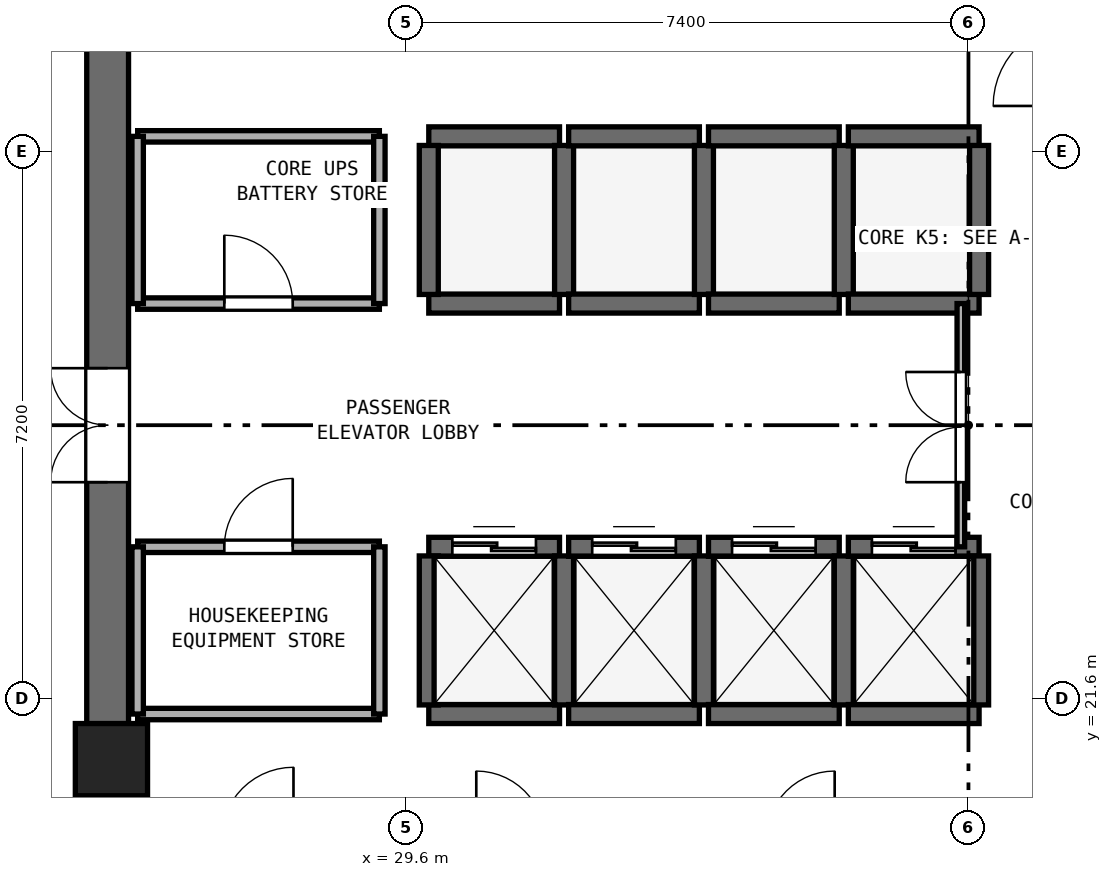
"""IFC4 building model, lengths in metres.
Left out: names, types, materials, properties, quantities, classifications, styles, units other than length and angle.
Written with IfcOpenShell. Run it as: python <this file> out.ifc"""

import sys

from ifc_helpers import new_model, si_unit, direction, frame, frame_2d, origin, origin_2d, place, context, subcontext, project, spatial, rectangle, extrude, element, fill, save


model = new_model("IFC4")
c1 = context("Model", 3, precision=1e-05, world=origin(), true_north=direction((0.0, 1.0)))
c2 = subcontext(c1, "Body", "Model", "MODEL_VIEW")
j1 = project(units=[si_unit("LENGTHUNIT", "METRE"), si_unit("PLANEANGLEUNIT", "RADIAN")], contexts=[c1])
p1 = place(None, origin())
s1 = spatial("IfcSite", under=j1, at=p1, CompositionType="ELEMENT")
p2 = place(p1, origin())
s2 = spatial("IfcBuilding", under=s1, at=p2, CompositionType="ELEMENT")
p3 = place(p2, frame((0.0, 0.0, 204.8)))
s3 = spatial("IfcBuildingStorey", under=s2, at=p3, CompositionType="ELEMENT", Elevation=204.8)
p4 = place(p3, frame((25.675, 17.55, 0.0), z_axis=(0.0, 0.0, 1.0), x_axis=(0.0, 1.0, 0.0)))
e1 = element("IfcWall", 1, at=p4, inside=s3, PredefinedType="SHEAR", context=c2, shape_type="SweptSolid", body=[
    extrude(rectangle(XDim=15.3, YDim=0.55, at=frame_2d((7.65, 0.0))), origin(), (0.0, 0.0, 1.0), 3.54),
])
p5 = place(p4, frame((6.9, 0.0, 0.0)))
e2 = element("IfcOpeningElement", 2, at=p5, cuts=e1, PredefinedType="OPENING", context=c2, shape_type="SweptSolid", body=[
    extrude(rectangle(XDim=1.5, YDim=2.15, at=frame_2d((0.75, 1.075))), frame((0.0, 0.285, 0.0), z_axis=(0.0, -1.0, 0.0), x_axis=(1.0, 0.0, 0.0)), (0.0, 0.0, 1.0), 0.57),
])
p6 = place(p3, frame((25.725, 20.8, 0.0), z_axis=(0.0, 0.0, 1.0), x_axis=(1.0, 0.0, 0.0)))
e3 = element("IfcColumn", 3, at=p6, inside=s3, PredefinedType="PILASTER", context=c2, shape_type="SweptSolid", body=[
    extrude(rectangle(XDim=0.95, YDim=0.95, at=origin_2d()), origin(), (0.0, 0.0, 1.0), 3.8),
])
p7 = place(p3, frame((29.9, 21.4, 0.0), z_axis=(0.0, 0.0, 1.0), x_axis=(1.0, 0.0, 0.0)))
e4 = element("IfcWall", 4, at=p7, inside=s3, PredefinedType="SHEAR", context=c2, shape_type="SweptSolid", body=[
    extrude(rectangle(XDim=1.72, YDim=0.25, at=frame_2d((0.86, 0.0))), origin(), (0.0, 0.0, 1.0), 3.54),
])
p8 = place(p3, frame((29.9, 23.6, 0.0), z_axis=(0.0, 0.0, 1.0), x_axis=(1.0, 0.0, 0.0)))
e5 = element("IfcWall", 5, at=p8, inside=s3, PredefinedType="SHEAR", context=c2, shape_type="SweptSolid", body=[
    extrude(rectangle(XDim=1.72, YDim=0.25, at=frame_2d((0.86, 0.0))), origin(), (0.0, 0.0, 1.0), 3.54),
])
p9 = place(p8, frame((0.31, 0.0, 0.0)))
e6 = element("IfcOpeningElement", 6, at=p9, cuts=e5, PredefinedType="OPENING", context=c2, shape_type="SweptSolid", body=[
    extrude(rectangle(XDim=1.1, YDim=2.15, at=frame_2d((0.55, 1.075))), frame((0.0, 0.135, 0.0), z_axis=(0.0, -1.0, 0.0), x_axis=(1.0, 0.0, 0.0)), (0.0, 0.0, 1.0), 0.27),
])
for number, where, z_axis, x_axis in (
    (7, (29.9, 21.52, 0.0), (0.0, 0.0, 1.0), (0.0, 1.0, 0.0)),
    (8, (31.68, 21.52, 0.0), (0.0, 0.0, 1.0), (0.0, 1.0, 0.0)),
):
    element("IfcWall", number, at=place(p3, frame(where, z_axis=z_axis, x_axis=x_axis)), inside=s3, PredefinedType="SHEAR", context=c2, shape_type="SweptSolid", body=[
        extrude(rectangle(XDim=1.96, YDim=0.25, at=frame_2d((0.98, 0.0))), origin(), (0.0, 0.0, 1.0), 3.54),
    ])
p10 = place(p3, frame((31.74, 21.4, 0.0), z_axis=(0.0, 0.0, 1.0), x_axis=(1.0, 0.0, 0.0)))
e9 = element("IfcWall", 9, at=p10, inside=s3, PredefinedType="SHEAR", context=c2, shape_type="SweptSolid", body=[
    extrude(rectangle(XDim=1.72, YDim=0.25, at=frame_2d((0.86, 0.0))), origin(), (0.0, 0.0, 1.0), 3.54),
])
p11 = place(p3, frame((31.74, 23.6, 0.0), z_axis=(0.0, 0.0, 1.0), x_axis=(1.0, 0.0, 0.0)))
e10 = element("IfcWall", 10, at=p11, inside=s3, PredefinedType="SHEAR", context=c2, shape_type="SweptSolid", body=[
    extrude(rectangle(XDim=1.72, YDim=0.25, at=frame_2d((0.86, 0.0))), origin(), (0.0, 0.0, 1.0), 3.54),
])
p12 = place(p11, frame((0.31, 0.0, 0.0)))
e11 = element("IfcOpeningElement", 11, at=p12, cuts=e10, PredefinedType="OPENING", context=c2, shape_type="SweptSolid", body=[
    extrude(rectangle(XDim=1.1, YDim=2.15, at=frame_2d((0.55, 1.075))), frame((0.0, 0.135, 0.0), z_axis=(0.0, -1.0, 0.0), x_axis=(1.0, 0.0, 0.0)), (0.0, 0.0, 1.0), 0.27),
])
p13 = place(p3, frame((33.52, 21.52, 0.0), z_axis=(0.0, 0.0, 1.0), x_axis=(0.0, 1.0, 0.0)))
e12 = element("IfcWall", 12, at=p13, inside=s3, PredefinedType="SHEAR", context=c2, shape_type="SweptSolid", body=[
    extrude(rectangle(XDim=1.96, YDim=0.25, at=frame_2d((0.98, 0.0))), origin(), (0.0, 0.0, 1.0), 3.54),
])
p14 = place(p3, frame((33.58, 21.4, 0.0), z_axis=(0.0, 0.0, 1.0), x_axis=(1.0, 0.0, 0.0)))
e13 = element("IfcWall", 13, at=p14, inside=s3, PredefinedType="SHEAR", context=c2, shape_type="SweptSolid", body=[
    extrude(rectangle(XDim=1.72, YDim=0.25, at=frame_2d((0.86, 0.0))), origin(), (0.0, 0.0, 1.0), 3.54),
])
p15 = place(p3, frame((33.58, 23.6, 0.0), z_axis=(0.0, 0.0, 1.0), x_axis=(1.0, 0.0, 0.0)))
e14 = element("IfcWall", 14, at=p15, inside=s3, PredefinedType="SHEAR", context=c2, shape_type="SweptSolid", body=[
    extrude(rectangle(XDim=1.72, YDim=0.25, at=frame_2d((0.86, 0.0))), origin(), (0.0, 0.0, 1.0), 3.54),
])
p16 = place(p15, frame((0.31, 0.0, 0.0)))
e15 = element("IfcOpeningElement", 15, at=p16, cuts=e14, PredefinedType="OPENING", context=c2, shape_type="SweptSolid", body=[
    extrude(rectangle(XDim=1.1, YDim=2.15, at=frame_2d((0.55, 1.075))), frame((0.0, 0.135, 0.0), z_axis=(0.0, -1.0, 0.0), x_axis=(1.0, 0.0, 0.0)), (0.0, 0.0, 1.0), 0.27),
])
p17 = place(p3, frame((35.36, 21.52, 0.0), z_axis=(0.0, 0.0, 1.0), x_axis=(0.0, 1.0, 0.0)))
e16 = element("IfcWall", 16, at=p17, inside=s3, PredefinedType="SHEAR", context=c2, shape_type="SweptSolid", body=[
    extrude(rectangle(XDim=1.96, YDim=0.25, at=frame_2d((0.98, 0.0))), origin(), (0.0, 0.0, 1.0), 3.54),
])
p18 = place(p3, frame((35.42, 21.4, 0.0), z_axis=(0.0, 0.0, 1.0), x_axis=(1.0, 0.0, 0.0)))
e17 = element("IfcWall", 17, at=p18, inside=s3, PredefinedType="SHEAR", context=c2, shape_type="SweptSolid", body=[
    extrude(rectangle(XDim=1.72, YDim=0.25, at=frame_2d((0.86, 0.0))), origin(), (0.0, 0.0, 1.0), 3.54),
])
p19 = place(p3, frame((35.42, 23.6, 0.0), z_axis=(0.0, 0.0, 1.0), x_axis=(1.0, 0.0, 0.0)))
e18 = element("IfcWall", 18, at=p19, inside=s3, PredefinedType="SHEAR", context=c2, shape_type="SweptSolid", body=[
    extrude(rectangle(XDim=1.72, YDim=0.25, at=frame_2d((0.86, 0.0))), origin(), (0.0, 0.0, 1.0), 3.54),
])
p20 = place(p19, frame((0.31, 0.0, 0.0)))
e19 = element("IfcOpeningElement", 19, at=p20, cuts=e18, PredefinedType="OPENING", context=c2, shape_type="SweptSolid", body=[
    extrude(rectangle(XDim=1.1, YDim=2.15, at=frame_2d((0.55, 1.075))), frame((0.0, 0.135, 0.0), z_axis=(0.0, -1.0, 0.0), x_axis=(1.0, 0.0, 0.0)), (0.0, 0.0, 1.0), 0.27),
])
p21 = place(p3, frame((37.14, 21.52, 0.0), z_axis=(0.0, 0.0, 1.0), x_axis=(0.0, 1.0, 0.0)))
e20 = element("IfcWall", 20, at=p21, inside=s3, PredefinedType="SHEAR", context=c2, shape_type="SweptSolid", body=[
    extrude(rectangle(XDim=1.96, YDim=0.25, at=frame_2d((0.98, 0.0))), origin(), (0.0, 0.0, 1.0), 3.54),
])
for number, where, z_axis, x_axis in (
    (21, (29.9, 26.8, 0.0), (0.0, 0.0, 1.0), (1.0, 0.0, 0.0)),
    (22, (29.9, 29.0, 0.0), (0.0, 0.0, 1.0), (1.0, 0.0, 0.0)),
):
    element("IfcWall", number, at=place(p3, frame(where, z_axis=z_axis, x_axis=x_axis)), inside=s3, PredefinedType="SHEAR", context=c2, shape_type="SweptSolid", body=[
        extrude(rectangle(XDim=1.72, YDim=0.25, at=frame_2d((0.86, 0.0))), origin(), (0.0, 0.0, 1.0), 3.54),
    ])
for number, where, z_axis, x_axis in (
    (23, (29.9, 26.92, 0.0), (0.0, 0.0, 1.0), (0.0, 1.0, 0.0)),
    (24, (31.68, 26.92, 0.0), (0.0, 0.0, 1.0), (0.0, 1.0, 0.0)),
):
    element("IfcWall", number, at=place(p3, frame(where, z_axis=z_axis, x_axis=x_axis)), inside=s3, PredefinedType="SHEAR", context=c2, shape_type="SweptSolid", body=[
        extrude(rectangle(XDim=1.96, YDim=0.25, at=frame_2d((0.98, 0.0))), origin(), (0.0, 0.0, 1.0), 3.54),
    ])
for number, where, z_axis, x_axis in (
    (25, (31.74, 26.8, 0.0), (0.0, 0.0, 1.0), (1.0, 0.0, 0.0)),
    (26, (31.74, 29.0, 0.0), (0.0, 0.0, 1.0), (1.0, 0.0, 0.0)),
):
    element("IfcWall", number, at=place(p3, frame(where, z_axis=z_axis, x_axis=x_axis)), inside=s3, PredefinedType="SHEAR", context=c2, shape_type="SweptSolid", body=[
        extrude(rectangle(XDim=1.72, YDim=0.25, at=frame_2d((0.86, 0.0))), origin(), (0.0, 0.0, 1.0), 3.54),
    ])
p22 = place(p3, frame((33.52, 26.92, 0.0), z_axis=(0.0, 0.0, 1.0), x_axis=(0.0, 1.0, 0.0)))
e27 = element("IfcWall", 27, at=p22, inside=s3, PredefinedType="SHEAR", context=c2, shape_type="SweptSolid", body=[
    extrude(rectangle(XDim=1.96, YDim=0.25, at=frame_2d((0.98, 0.0))), origin(), (0.0, 0.0, 1.0), 3.54),
])
for number, where, z_axis, x_axis in (
    (28, (33.58, 26.8, 0.0), (0.0, 0.0, 1.0), (1.0, 0.0, 0.0)),
    (29, (33.58, 29.0, 0.0), (0.0, 0.0, 1.0), (1.0, 0.0, 0.0)),
):
    element("IfcWall", number, at=place(p3, frame(where, z_axis=z_axis, x_axis=x_axis)), inside=s3, PredefinedType="SHEAR", context=c2, shape_type="SweptSolid", body=[
        extrude(rectangle(XDim=1.72, YDim=0.25, at=frame_2d((0.86, 0.0))), origin(), (0.0, 0.0, 1.0), 3.54),
    ])
p23 = place(p3, frame((35.36, 26.92, 0.0), z_axis=(0.0, 0.0, 1.0), x_axis=(0.0, 1.0, 0.0)))
e30 = element("IfcWall", 30, at=p23, inside=s3, PredefinedType="SHEAR", context=c2, shape_type="SweptSolid", body=[
    extrude(rectangle(XDim=1.96, YDim=0.25, at=frame_2d((0.98, 0.0))), origin(), (0.0, 0.0, 1.0), 3.54),
])
for number, where, z_axis, x_axis in (
    (31, (35.42, 26.8, 0.0), (0.0, 0.0, 1.0), (1.0, 0.0, 0.0)),
    (32, (35.42, 29.0, 0.0), (0.0, 0.0, 1.0), (1.0, 0.0, 0.0)),
):
    element("IfcWall", number, at=place(p3, frame(where, z_axis=z_axis, x_axis=x_axis)), inside=s3, PredefinedType="SHEAR", context=c2, shape_type="SweptSolid", body=[
        extrude(rectangle(XDim=1.72, YDim=0.25, at=frame_2d((0.86, 0.0))), origin(), (0.0, 0.0, 1.0), 3.54),
    ])
p24 = place(p3, frame((37.14, 26.92, 0.0), z_axis=(0.0, 0.0, 1.0), x_axis=(0.0, 1.0, 0.0)))
e33 = element("IfcWall", 33, at=p24, inside=s3, PredefinedType="SHEAR", context=c2, shape_type="SweptSolid", body=[
    extrude(rectangle(XDim=1.96, YDim=0.25, at=frame_2d((0.98, 0.0))), origin(), (0.0, 0.0, 1.0), 3.54),
])
p25 = place(p3, frame((26.07, 26.8, 0.0), z_axis=(0.0, 0.0, 1.0), x_axis=(1.0, 0.0, 0.0)))
e34 = element("IfcWall", 34, at=p25, inside=s3, PredefinedType="PARTITIONING", context=c2, shape_type="SweptSolid", body=[
    extrude(rectangle(XDim=3.18, YDim=0.15, at=frame_2d((1.59, 0.0))), origin(), (0.0, 0.0, 1.0), 3.54),
])
p26 = place(p25, frame((1.14, 0.0, 0.0)))
e35 = element("IfcOpeningElement", 35, at=p26, cuts=e34, PredefinedType="OPENING", context=c2, shape_type="SweptSolid", body=[
    extrude(rectangle(XDim=0.9, YDim=2.1, at=frame_2d((0.45, 1.05))), frame((0.0, 0.085, 0.0), z_axis=(0.0, -1.0, 0.0), x_axis=(1.0, 0.0, 0.0)), (0.0, 0.0, 1.0), 0.17),
])
p27 = place(p3, frame((26.07, 29.0, 0.0), z_axis=(0.0, 0.0, 1.0), x_axis=(1.0, 0.0, 0.0)))
e36 = element("IfcWall", 36, at=p27, inside=s3, PredefinedType="PARTITIONING", context=c2, shape_type="SweptSolid", body=[
    extrude(rectangle(XDim=3.18, YDim=0.15, at=frame_2d((1.59, 0.0))), origin(), (0.0, 0.0, 1.0), 3.54),
])
p28 = place(p3, frame((26.07, 26.8, 0.0), z_axis=(0.0, 0.0, 1.0), x_axis=(0.0, 1.0, 0.0)))
e37 = element("IfcWall", 37, at=p28, inside=s3, PredefinedType="PARTITIONING", context=c2, shape_type="SweptSolid", body=[
    extrude(rectangle(XDim=2.2, YDim=0.15, at=frame_2d((1.1, 0.0))), origin(), (0.0, 0.0, 1.0), 2.64),
])
p29 = place(p3, frame((29.25, 26.8, 0.0), z_axis=(0.0, 0.0, 1.0), x_axis=(0.0, 1.0, 0.0)))
e38 = element("IfcWall", 38, at=p29, inside=s3, PredefinedType="PARTITIONING", context=c2, shape_type="SweptSolid", body=[
    extrude(rectangle(XDim=2.2, YDim=0.15, at=frame_2d((1.1, 0.0))), origin(), (0.0, 0.0, 1.0), 3.54),
])
p30 = place(p3, frame((26.07, 21.4, 0.0), z_axis=(0.0, 0.0, 1.0), x_axis=(1.0, 0.0, 0.0)))
e39 = element("IfcWall", 39, at=p30, inside=s3, PredefinedType="PARTITIONING", context=c2, shape_type="SweptSolid", body=[
    extrude(rectangle(XDim=3.18, YDim=0.15, at=frame_2d((1.59, 0.0))), origin(), (0.0, 0.0, 1.0), 3.54),
])
p31 = place(p3, frame((26.07, 23.6, 0.0), z_axis=(0.0, 0.0, 1.0), x_axis=(1.0, 0.0, 0.0)))
e40 = element("IfcWall", 40, at=p31, inside=s3, PredefinedType="PARTITIONING", context=c2, shape_type="SweptSolid", body=[
    extrude(rectangle(XDim=3.18, YDim=0.15, at=frame_2d((1.59, 0.0))), origin(), (0.0, 0.0, 1.0), 3.54),
])
p32 = place(p31, frame((1.14, 0.0, 0.0)))
e41 = element("IfcOpeningElement", 41, at=p32, cuts=e40, PredefinedType="OPENING", context=c2, shape_type="SweptSolid", body=[
    extrude(rectangle(XDim=0.9, YDim=2.1, at=frame_2d((0.45, 1.05))), frame((0.0, 0.085, 0.0), z_axis=(0.0, -1.0, 0.0), x_axis=(1.0, 0.0, 0.0)), (0.0, 0.0, 1.0), 0.17),
])
p33 = place(p3, frame((26.07, 21.4, 0.0), z_axis=(0.0, 0.0, 1.0), x_axis=(0.0, 1.0, 0.0)))
e42 = element("IfcWall", 42, at=p33, inside=s3, PredefinedType="PARTITIONING", context=c2, shape_type="SweptSolid", body=[
    extrude(rectangle(XDim=2.2, YDim=0.15, at=frame_2d((1.1, 0.0))), origin(), (0.0, 0.0, 1.0), 2.64),
])
p34 = place(p3, frame((29.25, 21.4, 0.0), z_axis=(0.0, 0.0, 1.0), x_axis=(0.0, 1.0, 0.0)))
e43 = element("IfcWall", 43, at=p34, inside=s3, PredefinedType="PARTITIONING", context=c2, shape_type="SweptSolid", body=[
    extrude(rectangle(XDim=2.2, YDim=0.15, at=frame_2d((1.1, 0.0))), origin(), (0.0, 0.0, 1.0), 3.54),
])
p35 = place(p3, frame((36.9, 23.6, 0.0), z_axis=(0.0, 0.0, 1.0), x_axis=(0.0, 1.0, 0.0)))
e44 = element("IfcWall", 44, at=p35, inside=s3, PredefinedType="PARTITIONING", context=c2, shape_type="SweptSolid", body=[
    extrude(rectangle(XDim=3.2, YDim=0.1, at=frame_2d((1.6, 0.0))), origin(), (0.0, 0.0, 1.0), 3.54),
])
p36 = place(p35, frame((0.85, 0.0, 0.0)))
e45 = element("IfcOpeningElement", 45, at=p36, cuts=e44, PredefinedType="OPENING", context=c2, shape_type="SweptSolid", body=[
    extrude(rectangle(XDim=1.45, YDim=2.12, at=frame_2d((0.725, 1.06))), frame((0.0, 0.06, 0.0), z_axis=(0.0, -1.0, 0.0), x_axis=(1.0, 0.0, 0.0)), (0.0, 0.0, 1.0), 0.12),
])
p37 = place(p9, origin())
e46 = element("IfcDoor", 46, at=p37, inside=s3, OperationType="DOUBLE_DOOR_SLIDING", PredefinedType="DOOR", context=c2, shape_type="SweptSolid", body=[
    extrude(rectangle(XDim=1.1, YDim=2.15, at=frame_2d((0.55, 1.075))), frame((0.0, 0.025, 0.0), z_axis=(0.0, -1.0, 0.0), x_axis=(1.0, 0.0, 0.0)), (0.0, 0.0, 1.0), 0.05),
])
fill(e6, e46)
p38 = place(p12, origin())
e47 = element("IfcDoor", 47, at=p38, inside=s3, OperationType="DOUBLE_DOOR_SLIDING", PredefinedType="DOOR", context=c2, shape_type="SweptSolid", body=[
    extrude(rectangle(XDim=1.1, YDim=2.15, at=frame_2d((0.55, 1.075))), frame((0.0, 0.025, 0.0), z_axis=(0.0, -1.0, 0.0), x_axis=(1.0, 0.0, 0.0)), (0.0, 0.0, 1.0), 0.05),
])
fill(e11, e47)
p39 = place(p16, origin())
e48 = element("IfcDoor", 48, at=p39, inside=s3, OperationType="DOUBLE_DOOR_SLIDING", PredefinedType="DOOR", context=c2, shape_type="SweptSolid", body=[
    extrude(rectangle(XDim=1.1, YDim=2.15, at=frame_2d((0.55, 1.075))), frame((0.0, 0.025, 0.0), z_axis=(0.0, -1.0, 0.0), x_axis=(1.0, 0.0, 0.0)), (0.0, 0.0, 1.0), 0.05),
])
fill(e15, e48)
p40 = place(p20, origin())
e49 = element("IfcDoor", 49, at=p40, inside=s3, OperationType="DOUBLE_DOOR_SLIDING", PredefinedType="DOOR", context=c2, shape_type="SweptSolid", body=[
    extrude(rectangle(XDim=1.1, YDim=2.15, at=frame_2d((0.55, 1.075))), frame((0.0, 0.025, 0.0), z_axis=(0.0, -1.0, 0.0), x_axis=(1.0, 0.0, 0.0)), (0.0, 0.0, 1.0), 0.05),
])
fill(e19, e49)
p41 = place(p5, origin())
e50 = element("IfcDoor", 50, at=p41, inside=s3, OperationType="DOUBLE_DOOR_SINGLE_SWING", PredefinedType="DOOR", context=c2, shape_type="SweptSolid", body=[
    extrude(rectangle(XDim=1.5, YDim=2.15, at=frame_2d((0.75, 1.075))), frame((0.0, 0.025, 0.0), z_axis=(0.0, -1.0, 0.0), x_axis=(1.0, 0.0, 0.0)), (0.0, 0.0, 1.0), 0.05),
])
fill(e2, e50)
p42 = place(p26, origin())
e51 = element("IfcDoor", 51, at=p42, inside=s3, OperationType="SINGLE_SWING_LEFT", PredefinedType="DOOR", context=c2, shape_type="SweptSolid", body=[
    extrude(rectangle(XDim=0.9, YDim=2.1, at=frame_2d((0.45, 1.05))), frame((0.0, 0.025, 0.0), z_axis=(0.0, -1.0, 0.0), x_axis=(1.0, 0.0, 0.0)), (0.0, 0.0, 1.0), 0.05),
])
fill(e35, e51)
p43 = place(p32, origin())
e52 = element("IfcDoor", 52, at=p43, inside=s3, OperationType="SINGLE_SWING_RIGHT", PredefinedType="DOOR", context=c2, shape_type="SweptSolid", body=[
    extrude(rectangle(XDim=0.9, YDim=2.1, at=frame_2d((0.45, 1.05))), frame((0.0, 0.025, 0.0), z_axis=(0.0, -1.0, 0.0), x_axis=(1.0, 0.0, 0.0)), (0.0, 0.0, 1.0), 0.05),
])
fill(e41, e52)
p44 = place(p36, origin())
e53 = element("IfcDoor", 53, at=p44, inside=s3, OperationType="DOUBLE_DOOR_SINGLE_SWING", PredefinedType="DOOR", context=c2, shape_type="SweptSolid", body=[
    extrude(rectangle(XDim=1.45, YDim=2.12, at=frame_2d((0.725, 1.06))), frame((0.0, 0.025, 0.0), z_axis=(0.0, -1.0, 0.0), x_axis=(1.0, 0.0, 0.0)), (0.0, 0.0, 1.0), 0.05),
])
fill(e45, e53)
save(model, sys.argv[1])
